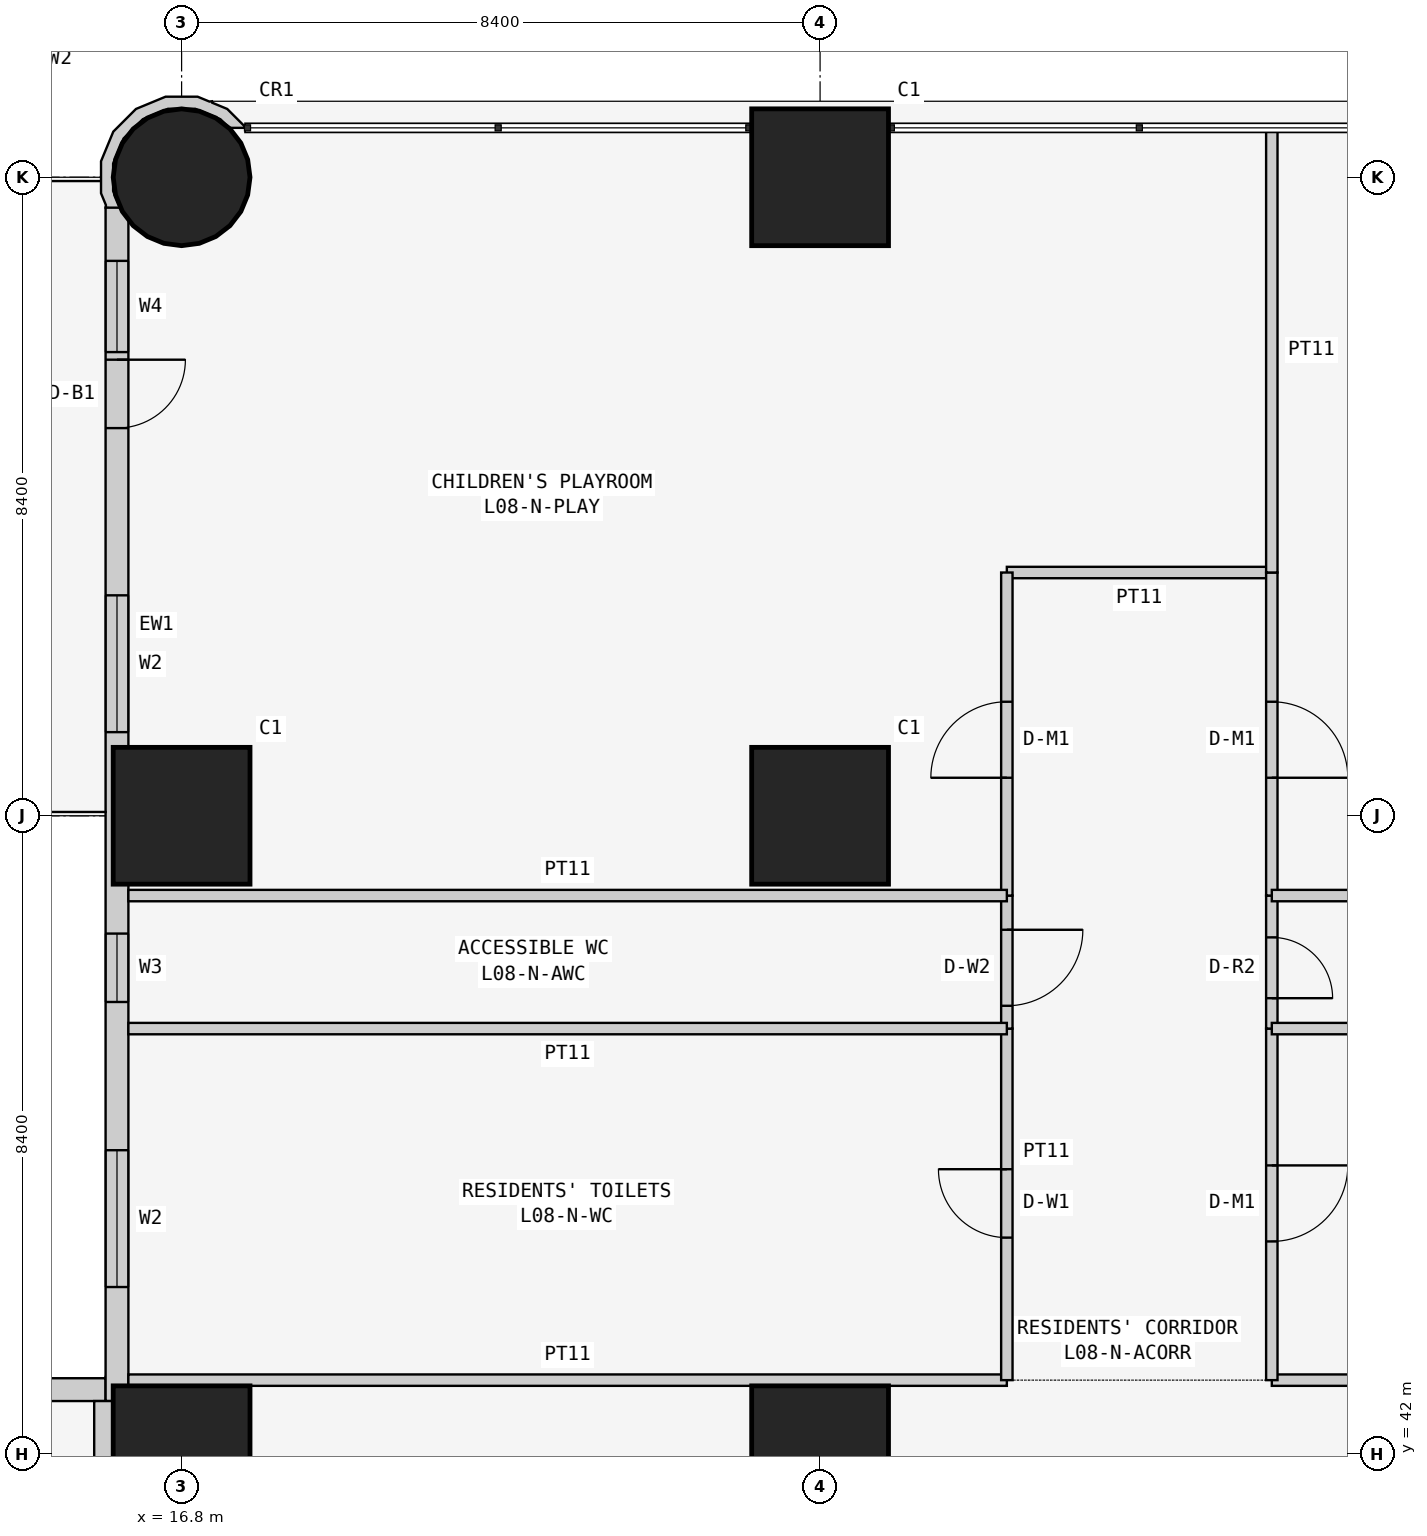
"""IFC4 building model, lengths in metres.
Left out: names, types, materials, properties, quantities, classifications, styles, units other than length and angle.
Written with IfcOpenShell. Run it as: python <this file> out.ifc"""

import sys

from ifc_helpers import new_model, si_unit, direction, frame, frame_2d, origin, origin_2d, place, context, subcontext, project, spatial, polyline, rectangle, circle, outline, extrude, element, fill, save


model = new_model("IFC4")
c1 = context("Model", 3, precision=1e-05, world=origin(), true_north=direction((0.0, 1.0)))
c2 = subcontext(c1, "Body", "Model", "MODEL_VIEW")
j1 = project(units=[si_unit("LENGTHUNIT", "METRE"), si_unit("PLANEANGLEUNIT", "RADIAN")], contexts=[c1])
p1 = place(None, origin())
s1 = spatial("IfcSite", under=j1, at=p1, CompositionType="ELEMENT")
p2 = place(p1, origin())
s2 = spatial("IfcBuilding", under=s1, at=p2, CompositionType="ELEMENT")
p3 = place(p2, frame((0.0, 0.0, 38.1)))
s3 = spatial("IfcBuildingStorey", under=s2, at=p3, CompositionType="ELEMENT", Elevation=38.1)
for number, where, z_axis, x_axis in (
    (1, (16.8, 42.0, 0.0), (0.0, 0.0, 1.0), (1.0, 0.0, 0.0)),
    (2, (16.8, 50.4, 0.0), (0.0, 0.0, 1.0), (1.0, 0.0, 0.0)),
):
    element("IfcColumn", number, at=place(p3, frame(where, z_axis=z_axis, x_axis=x_axis)), inside=s3, PredefinedType="COLUMN", context=c2, shape_type="SweptSolid", body=[
        extrude(rectangle(XDim=1.8, YDim=1.8, at=origin_2d()), origin(), (0.0, 0.0, 1.0), 3.6),
    ])
p4 = place(p3, frame((16.8, 58.8, 0.0), z_axis=(0.0, 0.0, 1.0), x_axis=(1.0, 0.0, 0.0)))
e3 = element("IfcColumn", 3, at=p4, inside=s3, PredefinedType="COLUMN", context=c2, shape_type="SweptSolid", body=[
    extrude(circle(Radius=0.9, at=origin_2d()), origin(), (0.0, 0.0, 1.0), 3.6),
])
for number, where, z_axis, x_axis in (
    (4, (25.2, 42.0, 0.0), (0.0, 0.0, 1.0), (1.0, 0.0, 0.0)),
    (5, (25.2, 50.4, 0.0), (0.0, 0.0, 1.0), (1.0, 0.0, 0.0)),
    (6, (25.2, 58.8, 0.0), (0.0, 0.0, 1.0), (1.0, 0.0, 0.0)),
):
    element("IfcColumn", number, at=place(p3, frame(where, z_axis=z_axis, x_axis=x_axis)), inside=s3, PredefinedType="COLUMN", context=c2, shape_type="SweptSolid", body=[
        extrude(rectangle(XDim=1.8, YDim=1.8, at=origin_2d()), origin(), (0.0, 0.0, 1.0), 3.6),
    ])
p5 = place(p3, frame((15.8, 42.85, 0.0), z_axis=(0.0, 0.0, 1.0), x_axis=(-1.0, 0.0, 0.0)))
e7 = element("IfcWall", 7, at=p5, inside=s3, PredefinedType="SOLIDWALL", context=c2, shape_type="SweptSolid", body=[
    extrude(rectangle(XDim=15.4, YDim=0.3, at=frame_2d((7.7, 0.0))), origin(), (0.0, 0.0, 1.0), 3.45),
])
p6 = place(p5, frame((1.2, 0.0, 0.9)))
e8 = element("IfcOpeningElement", 8, at=p6, cuts=e7, PredefinedType="OPENING", context=c2, shape_type="SweptSolid", body=[
    extrude(rectangle(XDim=1.8, YDim=1.5, at=frame_2d((0.9, 0.75))), frame((0.0, 0.16, 0.0), z_axis=(0.0, -1.0, 0.0), x_axis=(1.0, 0.0, 0.0)), (0.0, 0.0, 1.0), 0.32),
])
p7 = place(p5, frame((4.95, 0.0, 1.5)))
e9 = element("IfcOpeningElement", 9, at=p7, cuts=e7, PredefinedType="OPENING", context=c2, shape_type="SweptSolid", body=[
    extrude(rectangle(XDim=0.9, YDim=0.7, at=frame_2d((0.45, 0.35))), frame((0.0, 0.16, 0.0), z_axis=(0.0, -1.0, 0.0), x_axis=(1.0, 0.0, 0.0)), (0.0, 0.0, 1.0), 0.32),
])
p8 = place(p5, frame((8.5, 0.0, 0.9)))
e10 = element("IfcOpeningElement", 10, at=p8, cuts=e7, PredefinedType="OPENING", context=c2, shape_type="SweptSolid", body=[
    extrude(rectangle(XDim=1.8, YDim=1.5, at=frame_2d((0.9, 0.75))), frame((0.0, 0.16, 0.0), z_axis=(0.0, -1.0, 0.0), x_axis=(1.0, 0.0, 0.0)), (0.0, 0.0, 1.0), 0.32),
])
p9 = place(p5, frame((12.5, 0.0, 0.0)))
e11 = element("IfcOpeningElement", 11, at=p9, cuts=e7, PredefinedType="OPENING", context=c2, shape_type="SweptSolid", body=[
    extrude(rectangle(XDim=0.9, YDim=2.4, at=frame_2d((0.45, 1.2))), frame((0.0, 0.16, 0.0), z_axis=(0.0, -1.0, 0.0), x_axis=(1.0, 0.0, 0.0)), (0.0, 0.0, 1.0), 0.32),
])
p10 = place(p5, frame((13.5, 0.0, 0.9)))
e12 = element("IfcOpeningElement", 12, at=p10, cuts=e7, PredefinedType="OPENING", context=c2, shape_type="SweptSolid", body=[
    extrude(rectangle(XDim=1.2, YDim=1.5, at=frame_2d((0.6, 0.75))), frame((0.0, 0.16, 0.0), z_axis=(0.0, -1.0, 0.0), x_axis=(1.0, 0.0, 0.0)), (0.0, 0.0, 1.0), 0.32),
])
p11 = place(p3, frame((15.95, 58.4, 0.0), z_axis=(0.0, 0.0, 1.0), x_axis=(0.0, -1.0, 0.0)))
e13 = element("IfcWall", 13, at=p11, inside=s3, PredefinedType="SOLIDWALL", context=c2, shape_type="SweptSolid", body=[
    extrude(rectangle(XDim=15.7, YDim=0.3, at=frame_2d((7.85, 0.0))), origin(), (0.0, 0.0, 1.0), 3.45),
])
p12 = place(p11, frame((12.4, 0.0, 0.9)))
e14 = element("IfcOpeningElement", 14, at=p12, cuts=e13, PredefinedType="OPENING", context=c2, shape_type="SweptSolid", body=[
    extrude(rectangle(XDim=1.8, YDim=1.5, at=frame_2d((0.9, 0.75))), frame((0.0, 0.16, 0.0), z_axis=(0.0, -1.0, 0.0), x_axis=(1.0, 0.0, 0.0)), (0.0, 0.0, 1.0), 0.32),
])
p13 = place(p11, frame((9.55, 0.0, 1.5)))
e15 = element("IfcOpeningElement", 15, at=p13, cuts=e13, PredefinedType="OPENING", context=c2, shape_type="SweptSolid", body=[
    extrude(rectangle(XDim=0.9, YDim=0.7, at=frame_2d((0.45, 0.35))), frame((0.0, 0.16, 0.0), z_axis=(0.0, -1.0, 0.0), x_axis=(1.0, 0.0, 0.0)), (0.0, 0.0, 1.0), 0.32),
])
p14 = place(p11, frame((5.1, 0.0, 0.9)))
e16 = element("IfcOpeningElement", 16, at=p14, cuts=e13, PredefinedType="OPENING", context=c2, shape_type="SweptSolid", body=[
    extrude(rectangle(XDim=1.8, YDim=1.5, at=frame_2d((0.9, 0.75))), frame((0.0, 0.16, 0.0), z_axis=(0.0, -1.0, 0.0), x_axis=(1.0, 0.0, 0.0)), (0.0, 0.0, 1.0), 0.32),
])
p15 = place(p11, frame((2.0, 0.0, 0.0)))
e17 = element("IfcOpeningElement", 17, at=p15, cuts=e13, PredefinedType="OPENING", context=c2, shape_type="SweptSolid", body=[
    extrude(rectangle(XDim=0.9, YDim=2.4, at=frame_2d((0.45, 1.2))), frame((0.0, 0.16, 0.0), z_axis=(0.0, -1.0, 0.0), x_axis=(1.0, 0.0, 0.0)), (0.0, 0.0, 1.0), 0.32),
])
p16 = place(p11, frame((0.7, 0.0, 0.9)))
e18 = element("IfcOpeningElement", 18, at=p16, cuts=e13, PredefinedType="OPENING", context=c2, shape_type="SweptSolid", body=[
    extrude(rectangle(XDim=1.2, YDim=1.5, at=frame_2d((0.6, 0.75))), frame((0.0, 0.16, 0.0), z_axis=(0.0, -1.0, 0.0), x_axis=(1.0, 0.0, 0.0)), (0.0, 0.0, 1.0), 0.32),
])
p17 = place(p3, frame((17.567, 59.411, 0.0), z_axis=(0.0, 0.0, 1.0), x_axis=(-0.377204953059, 0.926129809145, 0.0)))
e19 = element("IfcWall", 19, at=p17, inside=s3, PredefinedType="SOLIDWALL", context=c2, shape_type="SweptSolid", body=[
    extrude(outline(polyline([(-0.27, 2.017), (-0.37, 1.841), (-0.102, 1.842), (0.23, 1.707), (0.484, 1.455), (0.624, 1.125), (0.626, 0.766), (0.491, 0.434), (0.239, 0.18), (0.09, 0.117), (0.011, -0.078), (0.024, -0.083), (0.329, 0.045), (0.48, 0.198), (0.499, 0.193), (0.508, 0.225), (0.626, 0.345), (0.785, 0.736), (0.782, 1.157), (0.619, 1.546), (0.319, 1.842), (-0.072, 2.002), (-0.24, 2.0), (-0.27, 2.017)])), origin(), (0.0, 0.0, 1.0), 3.45),
])
for number, where, z_axis, x_axis in (
    (20, (16.1, 42.975, 0.0), (0.0, 0.0, 1.0), (1.0, 0.0, 0.0)),
    (21, (31.143, 42.975, 0.0), (0.0, 0.0, 1.0), (1.0, 0.0, 0.0)),
):
    element("IfcWall", number, at=place(p3, frame(where, z_axis=z_axis, x_axis=x_axis)), inside=s3, PredefinedType="PARTITIONING", context=c2, shape_type="SweptSolid", body=[
        extrude(rectangle(XDim=11.557, YDim=0.15, at=frame_2d((5.778, 0.0))), origin(), (0.0, 0.0, 1.0), 3.45),
    ])
p18 = place(p3, frame((15.775, 36.229, 0.0), z_axis=(0.0, 0.0, 1.0), x_axis=(0.0, 1.0, 0.0)))
e22 = element("IfcWall", 22, at=p18, inside=s3, PredefinedType="PARTITIONING", context=c2, shape_type="SweptSolid", body=[
    extrude(rectangle(XDim=6.471, YDim=0.25, at=frame_2d((3.235, 0.0))), origin(), (0.0, 0.0, 1.0), 3.45),
])
p19 = place(p3, frame((27.657, 47.6, 0.0), z_axis=(0.0, 0.0, 1.0), x_axis=(0.0, -1.0, 0.0)))
e23 = element("IfcWall", 23, at=p19, inside=s3, PredefinedType="PARTITIONING", context=c2, shape_type="SweptSolid", body=[
    extrude(rectangle(XDim=4.625, YDim=0.15, at=frame_2d((2.312, 0.0))), origin(), (0.0, 0.0, 1.0), 3.45),
])
p20 = place(p19, frame((1.85, 0.0, 0.0)))
e24 = element("IfcOpeningElement", 24, at=p20, cuts=e23, PredefinedType="OPENING", context=c2, shape_type="SweptSolid", body=[
    extrude(rectangle(XDim=0.9, YDim=2.1, at=frame_2d((0.45, 1.05))), frame((0.0, 0.085, 0.0), z_axis=(0.0, -1.0, 0.0), x_axis=(1.0, 0.0, 0.0)), (0.0, 0.0, 1.0), 0.17),
])
p21 = place(p3, frame((27.657, 49.35, 0.0), z_axis=(0.0, 0.0, 1.0), x_axis=(0.0, -1.0, 0.0)))
e25 = element("IfcWall", 25, at=p21, inside=s3, PredefinedType="PARTITIONING", context=c2, shape_type="SweptSolid", body=[
    extrude(rectangle(XDim=1.75, YDim=0.15, at=frame_2d((0.875, 0.0))), origin(), (0.0, 0.0, 1.0), 3.45),
])
p22 = place(p21, frame((0.45, 0.0, 0.0)))
e26 = element("IfcOpeningElement", 26, at=p22, cuts=e25, PredefinedType="OPENING", context=c2, shape_type="SweptSolid", body=[
    extrude(rectangle(XDim=1.0, YDim=2.1, at=frame_2d((0.5, 1.05))), frame((0.0, 0.085, 0.0), z_axis=(0.0, -1.0, 0.0), x_axis=(1.0, 0.0, 0.0)), (0.0, 0.0, 1.0), 0.17),
])
p23 = place(p3, frame((31.143, 53.6, 0.0), z_axis=(0.0, 0.0, 1.0), x_axis=(-1.0, 0.0, 0.0)))
e27 = element("IfcWall", 27, at=p23, inside=s3, PredefinedType="PARTITIONING", context=c2, shape_type="SweptSolid", body=[
    extrude(rectangle(XDim=3.486, YDim=0.15, at=frame_2d((1.743, 0.0))), origin(), (0.0, 0.0, 1.0), 3.45),
])
p24 = place(p3, frame((27.657, 53.6, 0.0), z_axis=(0.0, 0.0, 1.0), x_axis=(0.0, -1.0, 0.0)))
e28 = element("IfcWall", 28, at=p24, inside=s3, PredefinedType="PARTITIONING", context=c2, shape_type="SweptSolid", body=[
    extrude(rectangle(XDim=4.25, YDim=0.15, at=frame_2d((2.125, 0.0))), origin(), (0.0, 0.0, 1.0), 3.45),
])
p25 = place(p24, frame((1.7, 0.0, 0.0)))
e29 = element("IfcOpeningElement", 29, at=p25, cuts=e28, PredefinedType="OPENING", context=c2, shape_type="SweptSolid", body=[
    extrude(rectangle(XDim=1.0, YDim=2.1, at=frame_2d((0.5, 1.05))), frame((0.0, 0.085, 0.0), z_axis=(0.0, -1.0, 0.0), x_axis=(1.0, 0.0, 0.0)), (0.0, 0.0, 1.0), 0.17),
])
p26 = place(p3, frame((31.143, 42.975, 0.0), z_axis=(0.0, 0.0, 1.0), x_axis=(0.0, 1.0, 0.0)))
e30 = element("IfcWall", 30, at=p26, inside=s3, PredefinedType="PARTITIONING", context=c2, shape_type="SweptSolid", body=[
    extrude(rectangle(XDim=4.625, YDim=0.15, at=frame_2d((2.312, 0.0))), origin(), (0.0, 0.0, 1.0), 3.45),
])
p27 = place(p26, frame((1.825, 0.0, 0.0)))
e31 = element("IfcOpeningElement", 31, at=p27, cuts=e30, PredefinedType="OPENING", context=c2, shape_type="SweptSolid", body=[
    extrude(rectangle(XDim=1.0, YDim=2.1, at=frame_2d((0.5, 1.05))), frame((0.0, 0.085, 0.0), z_axis=(0.0, -1.0, 0.0), x_axis=(1.0, 0.0, 0.0)), (0.0, 0.0, 1.0), 0.17),
])
p28 = place(p3, frame((31.143, 47.6, 0.0), z_axis=(0.0, 0.0, 1.0), x_axis=(0.0, 1.0, 0.0)))
e32 = element("IfcWall", 32, at=p28, inside=s3, PredefinedType="PARTITIONING", context=c2, shape_type="SweptSolid", body=[
    extrude(rectangle(XDim=1.75, YDim=0.15, at=frame_2d((0.875, 0.0))), origin(), (0.0, 0.0, 1.0), 3.45),
])
p29 = place(p28, frame((0.4, 0.0, 0.0)))
e33 = element("IfcOpeningElement", 33, at=p29, cuts=e32, PredefinedType="OPENING", context=c2, shape_type="SweptSolid", body=[
    extrude(rectangle(XDim=0.8, YDim=2.1, at=frame_2d((0.4, 1.05))), frame((0.0, 0.085, 0.0), z_axis=(0.0, -1.0, 0.0), x_axis=(1.0, 0.0, 0.0)), (0.0, 0.0, 1.0), 0.17),
])
p30 = place(p3, frame((31.143, 49.35, 0.0), z_axis=(0.0, 0.0, 1.0), x_axis=(0.0, 1.0, 0.0)))
e34 = element("IfcWall", 34, at=p30, inside=s3, PredefinedType="PARTITIONING", context=c2, shape_type="SweptSolid", body=[
    extrude(rectangle(XDim=4.25, YDim=0.15, at=frame_2d((2.125, 0.0))), origin(), (0.0, 0.0, 1.0), 3.45),
])
p31 = place(p30, frame((1.55, 0.0, 0.0)))
e35 = element("IfcOpeningElement", 35, at=p31, cuts=e34, PredefinedType="OPENING", context=c2, shape_type="SweptSolid", body=[
    extrude(rectangle(XDim=1.0, YDim=2.1, at=frame_2d((0.5, 1.05))), frame((0.0, 0.085, 0.0), z_axis=(0.0, -1.0, 0.0), x_axis=(1.0, 0.0, 0.0)), (0.0, 0.0, 1.0), 0.17),
])
for number, where, z_axis, x_axis in (
    (36, (27.657, 47.6, 0.0), (0.0, 0.0, 1.0), (-1.0, 0.0, 0.0)),
    (37, (27.657, 49.35, 0.0), (0.0, 0.0, 1.0), (-1.0, 0.0, 0.0)),
):
    element("IfcWall", number, at=place(p3, frame(where, z_axis=z_axis, x_axis=x_axis)), inside=s3, PredefinedType="PARTITIONING", context=c2, shape_type="SweptSolid", body=[
        extrude(rectangle(XDim=11.557, YDim=0.15, at=frame_2d((5.778, 0.0))), origin(), (0.0, 0.0, 1.0), 3.45),
    ])
p32 = place(p3, frame((31.143, 59.45, 0.0), z_axis=(0.0, 0.0, 1.0), x_axis=(0.0, -1.0, 0.0)))
e38 = element("IfcWall", 38, at=p32, inside=s3, PredefinedType="PARTITIONING", context=c2, shape_type="SweptSolid", body=[
    extrude(rectangle(XDim=5.85, YDim=0.15, at=frame_2d((2.925, 0.0))), origin(), (0.0, 0.0, 1.0), 3.45),
])
for number, where, z_axis, x_axis in (
    (39, (42.7, 47.6, 0.0), (0.0, 0.0, 1.0), (-1.0, 0.0, 0.0)),
    (40, (42.7, 49.35, 0.0), (0.0, 0.0, 1.0), (-1.0, 0.0, 0.0)),
):
    element("IfcWall", number, at=place(p3, frame(where, z_axis=z_axis, x_axis=x_axis)), inside=s3, PredefinedType="PARTITIONING", context=c2, shape_type="SweptSolid", body=[
        extrude(rectangle(XDim=11.557, YDim=0.15, at=frame_2d((5.778, 0.0))), origin(), (0.0, 0.0, 1.0), 3.45),
    ])
p33 = place(p12, origin())
e41 = element("IfcWindow", 41, at=p33, inside=s3, PartitioningType="SINGLE_PANEL", PredefinedType="WINDOW", context=c2, shape_type="SweptSolid", body=[
    extrude(rectangle(XDim=1.8, YDim=1.5, at=frame_2d((0.9, 0.75))), frame((0.0, 0.03, 0.0), z_axis=(0.0, -1.0, 0.0), x_axis=(1.0, 0.0, 0.0)), (0.0, 0.0, 1.0), 0.06),
])
fill(e14, e41)
p34 = place(p13, origin())
e42 = element("IfcWindow", 42, at=p34, inside=s3, PartitioningType="SINGLE_PANEL", PredefinedType="WINDOW", context=c2, shape_type="SweptSolid", body=[
    extrude(rectangle(XDim=0.9, YDim=0.7, at=frame_2d((0.45, 0.35))), frame((0.0, 0.03, 0.0), z_axis=(0.0, -1.0, 0.0), x_axis=(1.0, 0.0, 0.0)), (0.0, 0.0, 1.0), 0.06),
])
fill(e15, e42)
p35 = place(p14, origin())
e43 = element("IfcWindow", 43, at=p35, inside=s3, PartitioningType="SINGLE_PANEL", PredefinedType="WINDOW", context=c2, shape_type="SweptSolid", body=[
    extrude(rectangle(XDim=1.8, YDim=1.5, at=frame_2d((0.9, 0.75))), frame((0.0, 0.03, 0.0), z_axis=(0.0, -1.0, 0.0), x_axis=(1.0, 0.0, 0.0)), (0.0, 0.0, 1.0), 0.06),
])
fill(e16, e43)
p36 = place(p15, origin())
e44 = element("IfcDoor", 44, at=p36, inside=s3, OperationType="SINGLE_SWING_LEFT", PredefinedType="DOOR", context=c2, shape_type="SweptSolid", body=[
    extrude(rectangle(XDim=0.9, YDim=2.4, at=frame_2d((0.45, 1.2))), frame((0.0, 0.025, 0.0), z_axis=(0.0, -1.0, 0.0), x_axis=(1.0, 0.0, 0.0)), (0.0, 0.0, 1.0), 0.05),
])
fill(e17, e44)
p37 = place(p16, origin())
e45 = element("IfcWindow", 45, at=p37, inside=s3, PartitioningType="SINGLE_PANEL", PredefinedType="WINDOW", context=c2, shape_type="SweptSolid", body=[
    extrude(rectangle(XDim=1.2, YDim=1.5, at=frame_2d((0.6, 0.75))), frame((0.0, 0.03, 0.0), z_axis=(0.0, -1.0, 0.0), x_axis=(1.0, 0.0, 0.0)), (0.0, 0.0, 1.0), 0.06),
])
fill(e18, e45)
p38 = place(p20, frame((0.9, 0.0, 0.0), z_axis=(0.0, 0.0, 1.0), x_axis=(-1.0, 0.0, 0.0)))
e46 = element("IfcDoor", 46, at=p38, inside=s3, OperationType="SINGLE_SWING_RIGHT", PredefinedType="DOOR", context=c2, shape_type="SweptSolid", body=[
    extrude(rectangle(XDim=0.9, YDim=2.1, at=frame_2d((0.45, 1.05))), frame((0.0, 0.025, 0.0), z_axis=(0.0, -1.0, 0.0), x_axis=(1.0, 0.0, 0.0)), (0.0, 0.0, 1.0), 0.05),
])
fill(e24, e46)
p39 = place(p22, origin())
e47 = element("IfcDoor", 47, at=p39, inside=s3, OperationType="SINGLE_SWING_LEFT", PredefinedType="DOOR", context=c2, shape_type="SweptSolid", body=[
    extrude(rectangle(XDim=1.0, YDim=2.1, at=frame_2d((0.5, 1.05))), frame((0.0, 0.025, 0.0), z_axis=(0.0, -1.0, 0.0), x_axis=(1.0, 0.0, 0.0)), (0.0, 0.0, 1.0), 0.05),
])
fill(e26, e47)
p40 = place(p25, frame((1.0, 0.0, 0.0), z_axis=(0.0, 0.0, 1.0), x_axis=(-1.0, 0.0, 0.0)))
e48 = element("IfcDoor", 48, at=p40, inside=s3, OperationType="SINGLE_SWING_LEFT", PredefinedType="DOOR", context=c2, shape_type="SweptSolid", body=[
    extrude(rectangle(XDim=1.0, YDim=2.1, at=frame_2d((0.5, 1.05))), frame((0.0, 0.025, 0.0), z_axis=(0.0, -1.0, 0.0), x_axis=(1.0, 0.0, 0.0)), (0.0, 0.0, 1.0), 0.05),
])
fill(e29, e48)
p41 = place(p27, frame((1.0, 0.0, 0.0), z_axis=(0.0, 0.0, 1.0), x_axis=(-1.0, 0.0, 0.0)))
e49 = element("IfcDoor", 49, at=p41, inside=s3, OperationType="SINGLE_SWING_LEFT", PredefinedType="DOOR", context=c2, shape_type="SweptSolid", body=[
    extrude(rectangle(XDim=1.0, YDim=2.1, at=frame_2d((0.5, 1.05))), frame((0.0, 0.025, 0.0), z_axis=(0.0, -1.0, 0.0), x_axis=(1.0, 0.0, 0.0)), (0.0, 0.0, 1.0), 0.05),
])
fill(e31, e49)
p42 = place(p29, frame((0.8, 0.0, 0.0), z_axis=(0.0, 0.0, 1.0), x_axis=(-1.0, 0.0, 0.0)))
e50 = element("IfcDoor", 50, at=p42, inside=s3, OperationType="SINGLE_SWING_RIGHT", PredefinedType="DOOR", context=c2, shape_type="SweptSolid", body=[
    extrude(rectangle(XDim=0.8, YDim=2.1, at=frame_2d((0.4, 1.05))), frame((0.0, 0.025, 0.0), z_axis=(0.0, -1.0, 0.0), x_axis=(1.0, 0.0, 0.0)), (0.0, 0.0, 1.0), 0.05),
])
fill(e33, e50)
p43 = place(p31, frame((1.0, 0.0, 0.0), z_axis=(0.0, 0.0, 1.0), x_axis=(-1.0, 0.0, 0.0)))
e51 = element("IfcDoor", 51, at=p43, inside=s3, OperationType="SINGLE_SWING_RIGHT", PredefinedType="DOOR", context=c2, shape_type="SweptSolid", body=[
    extrude(rectangle(XDim=1.0, YDim=2.1, at=frame_2d((0.5, 1.05))), frame((0.0, 0.025, 0.0), z_axis=(0.0, -1.0, 0.0), x_axis=(1.0, 0.0, 0.0)), (0.0, 0.0, 1.0), 0.05),
])
fill(e35, e51)
save(model, sys.argv[1])
